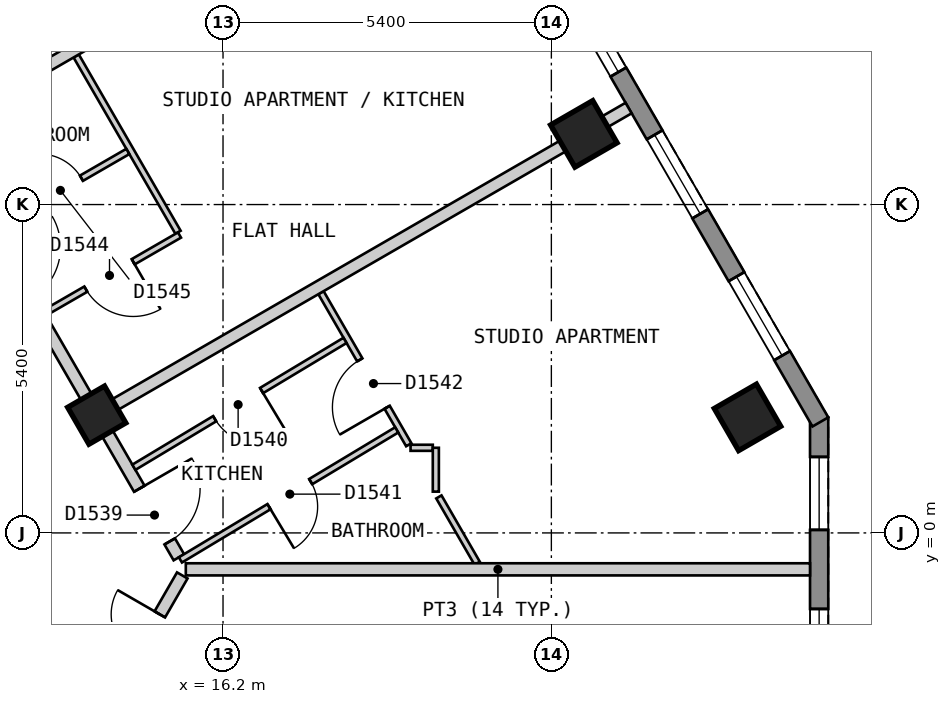
"""IFC4 building model, lengths in metres.
Left out: names, types, materials, properties, quantities, classifications, styles, units other than length and angle.
Written with IfcOpenShell. Run it as: python <this file> out.ifc"""

import sys

from ifc_helpers import new_model, si_unit, direction, frame, frame_2d, origin, origin_2d, place, context, subcontext, project, spatial, polyline, rectangle, outline, extrude, element, fill, save


model = new_model("IFC4")
c1 = context("Model", 3, precision=1e-05, world=origin(), true_north=direction((0.0, 1.0)))
c2 = subcontext(c1, "Body", "Model", "MODEL_VIEW")
j1 = project(units=[si_unit("LENGTHUNIT", "METRE"), si_unit("PLANEANGLEUNIT", "RADIAN")], contexts=[c1])
p1 = place(None, origin())
s1 = spatial("IfcSite", under=j1, at=p1, CompositionType="ELEMENT")
p2 = place(p1, origin())
s2 = spatial("IfcBuilding", under=s1, at=p2, CompositionType="ELEMENT")
p3 = place(p2, frame((0.0, 0.0, 190.2)))
s3 = spatial("IfcBuildingStorey", under=s2, at=p3, CompositionType="ELEMENT", Elevation=190.2)
for number, where, z_axis, x_axis in (
    (1, (24.826, 1.9, 0.0), (0.0, 0.0, 1.0), (-0.5, 0.866, 0.0)),
    (2, (22.134, 6.562, 0.0), (0.0, 0.0, 1.0), (-0.5, 0.866, 0.0)),
):
    element("IfcColumn", number, at=place(p3, frame(where, z_axis=z_axis, x_axis=x_axis)), inside=s3, PredefinedType="COLUMN", context=c2, shape_type="SweptSolid", body=[
        extrude(rectangle(XDim=0.8, YDim=0.8, at=origin_2d()), origin(), (0.0, 0.0, 1.0), 3.0),
    ])
p4 = place(p3, frame((14.123, 1.937, 0.0), z_axis=(0.0, 0.0, 1.0), x_axis=(-0.5, 0.866025403784, 0.0)))
e3 = element("IfcColumn", 3, at=p4, inside=s3, PredefinedType="COLUMN", context=c2, shape_type="SweptSolid", body=[
    extrude(rectangle(XDim=0.7, YDim=0.7, at=origin_2d()), origin(), (0.0, 0.0, 1.0), 3.0),
])
p5 = place(p3, frame((26.004, -3.1, 0.0), z_axis=(0.0, 0.0, 1.0), x_axis=(0.0, 1.0, 0.0)))
e4 = element("IfcWall", 4, at=p5, inside=s3, PredefinedType="SOLIDWALL", context=c2, shape_type="SweptSolid", body=[
    extrude(outline(polyline([(0.0, -0.15), (5.0, -0.15), (4.92, 0.15), (0.08, 0.15), (0.0, -0.15)])), origin(), (0.0, 0.0, 1.0), 2.7),
])
p6 = place(p5, frame((0.65, 0.0, 0.15)))
e5 = element("IfcOpeningElement", 5, at=p6, cuts=e4, PredefinedType="OPENING", context=c2, shape_type="SweptSolid", body=[
    extrude(rectangle(XDim=1.2, YDim=2.1, at=frame_2d((0.6, 1.05))), frame((0.0, 0.16, 0.0), z_axis=(0.0, -1.0, 0.0), x_axis=(1.0, 0.0, 0.0)), (0.0, 0.0, 1.0), 0.32),
])
p7 = place(p5, frame((3.15, 0.0, 0.15)))
e6 = element("IfcOpeningElement", 6, at=p7, cuts=e4, PredefinedType="OPENING", context=c2, shape_type="SweptSolid", body=[
    extrude(rectangle(XDim=1.2, YDim=2.1, at=frame_2d((0.6, 1.05))), frame((0.0, 0.16, 0.0), z_axis=(0.0, -1.0, 0.0), x_axis=(1.0, 0.0, 0.0)), (0.0, 0.0, 1.0), 0.32),
])
p8 = place(p3, frame((26.024, 1.825, 0.0), z_axis=(0.0, 0.0, 1.0), x_axis=(-0.500010537973, 0.866019319597, 0.0)))
e7 = element("IfcWall", 7, at=p8, inside=s3, PredefinedType="SOLIDWALL", context=c2, shape_type="SweptSolid", body=[
    extrude(outline(polyline([(0.0, -0.15), (22.863, -0.15), (22.783, 0.15), (0.08, 0.15), (0.0, -0.15)])), origin(), (0.0, 0.0, 1.0), 2.7),
])
p9 = place(p8, frame((1.259, 0.0, 0.15)))
e8 = element("IfcOpeningElement", 8, at=p9, cuts=e7, PredefinedType="OPENING", context=c2, shape_type="SweptSolid", body=[
    extrude(rectangle(XDim=1.5, YDim=2.1, at=frame_2d((0.75, 1.05))), frame((0.0, 0.16, 0.0), z_axis=(0.0, -1.0, 0.0), x_axis=(1.0, 0.0, 0.0)), (0.0, 0.0, 1.0), 0.32),
])
p10 = place(p8, frame((3.952, 0.0, 0.15)))
e9 = element("IfcOpeningElement", 9, at=p10, cuts=e7, PredefinedType="OPENING", context=c2, shape_type="SweptSolid", body=[
    extrude(rectangle(XDim=1.5, YDim=2.1, at=frame_2d((0.75, 1.05))), frame((0.0, 0.16, 0.0), z_axis=(0.0, -1.0, 0.0), x_axis=(1.0, 0.0, 0.0)), (0.0, 0.0, 1.0), 0.32),
])
p11 = place(p8, frame((6.644, 0.0, 0.15)))
e10 = element("IfcOpeningElement", 10, at=p11, cuts=e7, PredefinedType="OPENING", context=c2, shape_type="SweptSolid", body=[
    extrude(rectangle(XDim=1.5, YDim=2.1, at=frame_2d((0.75, 1.05))), frame((0.0, 0.16, 0.0), z_axis=(0.0, -1.0, 0.0), x_axis=(1.0, 0.0, 0.0)), (0.0, 0.0, 1.0), 0.32),
])
p12 = place(p8, frame((9.335, 0.0, 0.15)))
e11 = element("IfcOpeningElement", 11, at=p12, cuts=e7, PredefinedType="OPENING", context=c2, shape_type="SweptSolid", body=[
    extrude(rectangle(XDim=1.5, YDim=2.1, at=frame_2d((0.75, 1.05))), frame((0.0, 0.16, 0.0), z_axis=(0.0, -1.0, 0.0), x_axis=(1.0, 0.0, 0.0)), (0.0, 0.0, 1.0), 0.32),
])
p13 = place(p8, frame((12.028, 0.0, 0.15)))
e12 = element("IfcOpeningElement", 12, at=p13, cuts=e7, PredefinedType="OPENING", context=c2, shape_type="SweptSolid", body=[
    extrude(rectangle(XDim=1.5, YDim=2.1, at=frame_2d((0.75, 1.05))), frame((0.0, 0.16, 0.0), z_axis=(0.0, -1.0, 0.0), x_axis=(1.0, 0.0, 0.0)), (0.0, 0.0, 1.0), 0.32),
])
p14 = place(p8, frame((14.72, 0.0, 0.15)))
e13 = element("IfcOpeningElement", 13, at=p14, cuts=e7, PredefinedType="OPENING", context=c2, shape_type="SweptSolid", body=[
    extrude(rectangle(XDim=1.5, YDim=2.1, at=frame_2d((0.75, 1.05))), frame((0.0, 0.16, 0.0), z_axis=(0.0, -1.0, 0.0), x_axis=(1.0, 0.0, 0.0)), (0.0, 0.0, 1.0), 0.32),
])
p15 = place(p8, frame((17.411, 0.0, 0.15)))
e14 = element("IfcOpeningElement", 14, at=p15, cuts=e7, PredefinedType="OPENING", context=c2, shape_type="SweptSolid", body=[
    extrude(rectangle(XDim=1.5, YDim=2.1, at=frame_2d((0.75, 1.05))), frame((0.0, 0.16, 0.0), z_axis=(0.0, -1.0, 0.0), x_axis=(1.0, 0.0, 0.0)), (0.0, 0.0, 1.0), 0.32),
])
p16 = place(p8, frame((20.104, 0.0, 0.15)))
e15 = element("IfcOpeningElement", 15, at=p16, cuts=e7, PredefinedType="OPENING", context=c2, shape_type="SweptSolid", body=[
    extrude(rectangle(XDim=1.5, YDim=2.1, at=frame_2d((0.75, 1.05))), frame((0.0, 0.16, 0.0), z_axis=(0.0, -1.0, 0.0), x_axis=(1.0, 0.0, 0.0)), (0.0, 0.0, 1.0), 0.32),
])
p17 = place(p3, frame((10.739, 7.8, 0.0), z_axis=(0.0, 0.0, 1.0), x_axis=(0.500023726918, -0.866011704609, 0.0)))
e16 = element("IfcWall", 16, at=p17, inside=s3, PredefinedType="PARTITIONING", context=c2, shape_type="SweptSolid", body=[
    extrude(rectangle(XDim=9.47, YDim=0.2, at=frame_2d((4.735, 0.0))), origin(), (0.0, 0.0, 1.0), 2.7),
])
p18 = place(p17, frame((8.168, 0.0, 0.0)))
e17 = element("IfcOpeningElement", 17, at=p18, cuts=e16, PredefinedType="OPENING", context=c2, shape_type="SweptSolid", body=[
    extrude(rectangle(XDim=1.0, YDim=2.1, at=frame_2d((0.5, 1.05))), frame((0.0, 0.11, 0.0), z_axis=(0.0, -1.0, 0.0), x_axis=(1.0, 0.0, 0.0)), (0.0, 0.0, 1.0), 0.22),
])
p19 = place(p17, frame((3.578, 0.0, 0.0)))
e18 = element("IfcOpeningElement", 18, at=p19, cuts=e16, PredefinedType="OPENING", context=c2, shape_type="SweptSolid", body=[
    extrude(rectangle(XDim=1.0, YDim=2.1, at=frame_2d((0.5, 1.05))), frame((0.0, 0.11, 0.0), z_axis=(0.0, -1.0, 0.0), x_axis=(1.0, 0.0, 0.0)), (0.0, 0.0, 1.0), 0.22),
])
p20 = place(p3, frame((14.318, -2.8, 0.0), z_axis=(0.0, 0.0, 1.0), x_axis=(0.49964693309, 0.866229151122, 0.0)))
e19 = element("IfcWall", 19, at=p20, inside=s3, PredefinedType="PARTITIONING", context=c2, shape_type="SweptSolid", body=[
    extrude(rectangle(XDim=2.426, YDim=0.2, at=frame_2d((1.213, 0.0))), origin(), (0.0, 0.0, 1.0), 2.7),
])
p21 = place(p20, frame((0.886, 0.0, 0.0)))
e20 = element("IfcOpeningElement", 20, at=p21, cuts=e19, PredefinedType="OPENING", context=c2, shape_type="SweptSolid", body=[
    extrude(rectangle(XDim=0.8, YDim=2.1, at=frame_2d((0.4, 1.05))), frame((0.0, 0.11, 0.0), z_axis=(0.0, -1.0, 0.0), x_axis=(1.0, 0.0, 0.0)), (0.0, 0.0, 1.0), 0.22),
])
p22 = place(p3, frame((13.785, 7.844, 0.0), z_axis=(0.0, 0.0, 1.0), x_axis=(0.500176784828, -0.865923312955, 0.0)))
e21 = element("IfcWall", 21, at=p22, inside=s3, PredefinedType="PARTITIONING", context=c2, shape_type="SweptSolid", body=[
    extrude(rectangle(XDim=3.349, YDim=0.1, at=frame_2d((1.674, 0.0))), origin(), (0.0, 0.0, 1.0), 2.7),
])
p23 = place(p3, frame((17.811, 3.951, 0.0), z_axis=(0.0, 0.0, 1.0), x_axis=(0.499976149225, -0.866039173598, 0.0)))
e22 = element("IfcWall", 22, at=p23, inside=s3, PredefinedType="PARTITIONING", context=c2, shape_type="SweptSolid", body=[
    extrude(rectangle(XDim=2.888, YDim=0.1, at=frame_2d((1.444, 0.0))), origin(), (0.0, 0.0, 1.0), 2.7),
])
p24 = place(p23, frame((1.276, 0.0, 0.0)))
e23 = element("IfcOpeningElement", 23, at=p24, cuts=e22, PredefinedType="OPENING", context=c2, shape_type="SweptSolid", body=[
    extrude(rectangle(XDim=0.9, YDim=2.1, at=frame_2d((0.45, 1.05))), frame((0.0, 0.06, 0.0), z_axis=(0.0, -1.0, 0.0), x_axis=(1.0, 0.0, 0.0)), (0.0, 0.0, 1.0), 0.12),
])
p25 = place(p3, frame((19.75, 0.592, 0.0), z_axis=(0.0, 0.0, 1.0), x_axis=(0.499974077718, -0.866040369504, 0.0)))
e24 = element("IfcWall", 24, at=p25, inside=s3, PredefinedType="PARTITIONING", context=c2, shape_type="SweptSolid", body=[
    extrude(rectangle(XDim=1.26, YDim=0.1, at=frame_2d((0.63, 0.0))), origin(), (0.0, 0.0, 1.0), 2.7),
])
p26 = place(p3, frame((19.284, 1.4, 0.0), z_axis=(0.0, 0.0, 1.0), x_axis=(1.0, 0.0, 0.0)))
e25 = element("IfcWall", 25, at=p26, inside=s3, PredefinedType="PARTITIONING", context=c2, shape_type="SweptSolid", body=[
    extrude(rectangle(XDim=0.366, YDim=0.1, at=frame_2d((0.183, 0.0))), origin(), (0.0, 0.0, 1.0), 2.7),
])
p27 = place(p3, frame((19.7, 0.679, 0.0), z_axis=(0.0, 0.0, 1.0), x_axis=(0.0, 1.0, 0.0)))
e26 = element("IfcWall", 26, at=p27, inside=s3, PredefinedType="PARTITIONING", context=c2, shape_type="SweptSolid", body=[
    extrude(rectangle(XDim=0.721, YDim=0.1, at=frame_2d((0.36, 0.0))), origin(), (0.0, 0.0, 1.0), 2.7),
])
p28 = place(p3, frame((13.268, 3.619, 0.0), z_axis=(0.0, 0.0, 1.0), x_axis=(0.865902724456, 0.500212426655, 0.0)))
e27 = element("IfcWall", 27, at=p28, inside=s3, PredefinedType="PARTITIONING", context=c2, shape_type="SweptSolid", body=[
    extrude(rectangle(XDim=2.559, YDim=0.1, at=frame_2d((1.28, 0.0))), origin(), (0.0, 0.0, 1.0), 2.7),
])
p29 = place(p28, frame((0.78, 0.0, 0.0)))
e28 = element("IfcOpeningElement", 28, at=p29, cuts=e27, PredefinedType="OPENING", context=c2, shape_type="SweptSolid", body=[
    extrude(rectangle(XDim=0.9, YDim=2.1, at=frame_2d((0.45, 1.05))), frame((0.0, 0.06, 0.0), z_axis=(0.0, -1.0, 0.0), x_axis=(1.0, 0.0, 0.0)), (0.0, 0.0, 1.0), 0.12),
])
p30 = place(p3, frame((12.46, 5.018, 0.0), z_axis=(0.0, 0.0, 1.0), x_axis=(0.866080321209, 0.499904868165, 0.0)))
e29 = element("IfcWall", 29, at=p30, inside=s3, PredefinedType="PARTITIONING", context=c2, shape_type="SweptSolid", body=[
    extrude(rectangle(XDim=2.51, YDim=0.1, at=frame_2d((1.255, 0.0))), origin(), (0.0, 0.0, 1.0), 2.7),
])
p31 = place(p30, frame((0.83, 0.0, 0.0)))
e30 = element("IfcOpeningElement", 30, at=p31, cuts=e29, PredefinedType="OPENING", context=c2, shape_type="SweptSolid", body=[
    extrude(rectangle(XDim=0.8, YDim=2.1, at=frame_2d((0.4, 1.05))), frame((0.0, 0.06, 0.0), z_axis=(0.0, -1.0, 0.0), x_axis=(1.0, 0.0, 0.0)), (0.0, 0.0, 1.0), 0.12),
])
p32 = place(p3, frame((14.734, 1.08, 0.0), z_axis=(0.0, 0.0, 1.0), x_axis=(0.857205608004, 0.514974315482, 0.0)))
e31 = element("IfcWall", 31, at=p32, inside=s3, PredefinedType="PARTITIONING", context=c2, shape_type="SweptSolid", body=[
    extrude(rectangle(XDim=4.051, YDim=0.1, at=frame_2d((2.025, 0.0))), origin(), (0.0, 0.0, 1.0), 2.7),
])
p33 = place(p32, frame((1.55, 0.0, 0.0)))
e32 = element("IfcOpeningElement", 32, at=p33, cuts=e31, PredefinedType="OPENING", context=c2, shape_type="SweptSolid", body=[
    extrude(rectangle(XDim=0.9, YDim=2.1, at=frame_2d((0.45, 1.05))), frame((0.0, 0.06, 0.0), z_axis=(0.0, -1.0, 0.0), x_axis=(1.0, 0.0, 0.0)), (0.0, 0.0, 1.0), 0.12),
])
p34 = place(p3, frame((15.499, -0.444, 0.0), z_axis=(0.0, 0.0, 1.0), x_axis=(0.857061798163, 0.515213619899, 0.0)))
e33 = element("IfcWall", 33, at=p34, inside=s3, PredefinedType="PARTITIONING", context=c2, shape_type="SweptSolid", body=[
    extrude(rectangle(XDim=4.15, YDim=0.1, at=frame_2d((2.075, 0.0))), origin(), (0.0, 0.0, 1.0), 2.7),
])
p35 = place(p34, frame((1.7, 0.0, 0.0)))
e34 = element("IfcOpeningElement", 34, at=p35, cuts=e33, PredefinedType="OPENING", context=c2, shape_type="SweptSolid", body=[
    extrude(rectangle(XDim=0.8, YDim=2.1, at=frame_2d((0.4, 1.05))), frame((0.0, 0.06, 0.0), z_axis=(0.0, -1.0, 0.0), x_axis=(1.0, 0.0, 0.0)), (0.0, 0.0, 1.0), 0.12),
])
p36 = place(p3, frame((15.588, -0.599, 0.0), z_axis=(0.0, 0.0, 1.0), x_axis=(1.0, 0.0, 0.0)))
e35 = element("IfcWall", 35, at=p36, inside=s3, PredefinedType="PARTITIONING", context=c2, shape_type="SweptSolid", body=[
    extrude(rectangle(XDim=10.266, YDim=0.2, at=frame_2d((5.133, 0.0))), origin(), (0.0, 0.0, 1.0), 2.7),
])
p37 = place(p3, frame((14.21, 1.987, 0.0), z_axis=(0.0, 0.0, 1.0), x_axis=(0.866022959057, 0.500004234368, 0.0)))
e36 = element("IfcWall", 36, at=p37, inside=s3, PredefinedType="PARTITIONING", context=c2, shape_type="SweptSolid", body=[
    extrude(rectangle(XDim=10.0, YDim=0.2, at=frame_2d((5.0, 0.0))), origin(), (0.0, 0.0, 1.0), 2.7),
])
p38 = place(p3, frame((11.518, 6.65, 0.0), z_axis=(0.0, 0.0, 1.0), x_axis=(0.866016855193, 0.500014806302, 0.0)))
e37 = element("IfcWall", 37, at=p38, inside=s3, PredefinedType="PARTITIONING", context=c2, shape_type="SweptSolid", body=[
    extrude(rectangle(XDim=10.0, YDim=0.2, at=frame_2d((5.0, 0.0))), origin(), (0.0, 0.0, 1.0), 2.7),
])
p39 = place(p6, origin())
e38 = element("IfcWindow", 38, at=p39, inside=s3, PartitioningType="SINGLE_PANEL", PredefinedType="WINDOW", context=c2, shape_type="SweptSolid", body=[
    extrude(rectangle(XDim=1.2, YDim=2.1, at=frame_2d((0.6, 1.05))), frame((0.0, 0.03, 0.0), z_axis=(0.0, -1.0, 0.0), x_axis=(1.0, 0.0, 0.0)), (0.0, 0.0, 1.0), 0.06),
])
fill(e5, e38)
p40 = place(p7, origin())
e39 = element("IfcWindow", 39, at=p40, inside=s3, PartitioningType="SINGLE_PANEL", PredefinedType="WINDOW", context=c2, shape_type="SweptSolid", body=[
    extrude(rectangle(XDim=1.2, YDim=2.1, at=frame_2d((0.6, 1.05))), frame((0.0, 0.03, 0.0), z_axis=(0.0, -1.0, 0.0), x_axis=(1.0, 0.0, 0.0)), (0.0, 0.0, 1.0), 0.06),
])
fill(e6, e39)
p41 = place(p9, origin())
e40 = element("IfcWindow", 40, at=p41, inside=s3, PartitioningType="SINGLE_PANEL", PredefinedType="WINDOW", context=c2, shape_type="SweptSolid", body=[
    extrude(rectangle(XDim=1.5, YDim=2.1, at=frame_2d((0.75, 1.05))), frame((0.0, 0.03, 0.0), z_axis=(0.0, -1.0, 0.0), x_axis=(1.0, 0.0, 0.0)), (0.0, 0.0, 1.0), 0.06),
])
fill(e8, e40)
p42 = place(p10, origin())
e41 = element("IfcWindow", 41, at=p42, inside=s3, PartitioningType="SINGLE_PANEL", PredefinedType="WINDOW", context=c2, shape_type="SweptSolid", body=[
    extrude(rectangle(XDim=1.5, YDim=2.1, at=frame_2d((0.75, 1.05))), frame((0.0, 0.03, 0.0), z_axis=(0.0, -1.0, 0.0), x_axis=(1.0, 0.0, 0.0)), (0.0, 0.0, 1.0), 0.06),
])
fill(e9, e41)
p43 = place(p11, origin())
e42 = element("IfcWindow", 42, at=p43, inside=s3, PartitioningType="SINGLE_PANEL", PredefinedType="WINDOW", context=c2, shape_type="SweptSolid", body=[
    extrude(rectangle(XDim=1.5, YDim=2.1, at=frame_2d((0.75, 1.05))), frame((0.0, 0.03, 0.0), z_axis=(0.0, -1.0, 0.0), x_axis=(1.0, 0.0, 0.0)), (0.0, 0.0, 1.0), 0.06),
])
fill(e10, e42)
p44 = place(p21, origin())
e43 = element("IfcDoor", 43, at=p44, inside=s3, OperationType="SINGLE_SWING_RIGHT", PredefinedType="DOOR", context=c2, shape_type="SweptSolid", body=[
    extrude(rectangle(XDim=0.8, YDim=2.1, at=frame_2d((0.4, 1.05))), frame((0.0, 0.025, 0.0), z_axis=(0.0, -1.0, 0.0), x_axis=(1.0, 0.0, 0.0)), (0.0, 0.0, 1.0), 0.05),
])
fill(e20, e43)
p45 = place(p18, origin())
e44 = element("IfcDoor", 44, at=p45, inside=s3, OperationType="SINGLE_SWING_LEFT", PredefinedType="DOOR", context=c2, shape_type="SweptSolid", body=[
    extrude(rectangle(XDim=1.0, YDim=2.1, at=frame_2d((0.5, 1.05))), frame((0.0, 0.025, 0.0), z_axis=(0.0, -1.0, 0.0), x_axis=(1.0, 0.0, 0.0)), (0.0, 0.0, 1.0), 0.05),
])
fill(e17, e44)
p46 = place(p33, origin())
e45 = element("IfcDoor", 45, at=p46, inside=s3, OperationType="SINGLE_SWING_RIGHT", PredefinedType="DOOR", context=c2, shape_type="SweptSolid", body=[
    extrude(rectangle(XDim=0.9, YDim=2.1, at=frame_2d((0.45, 1.05))), frame((0.0, 0.025, 0.0), z_axis=(0.0, -1.0, 0.0), x_axis=(1.0, 0.0, 0.0)), (0.0, 0.0, 1.0), 0.05),
])
fill(e32, e45)
p47 = place(p35, origin())
e46 = element("IfcDoor", 46, at=p47, inside=s3, OperationType="SINGLE_SWING_LEFT", PredefinedType="DOOR", context=c2, shape_type="SweptSolid", body=[
    extrude(rectangle(XDim=0.8, YDim=2.1, at=frame_2d((0.4, 1.05))), frame((0.0, 0.025, 0.0), z_axis=(0.0, -1.0, 0.0), x_axis=(1.0, 0.0, 0.0)), (0.0, 0.0, 1.0), 0.05),
])
fill(e34, e46)
p48 = place(p24, origin())
e47 = element("IfcDoor", 47, at=p48, inside=s3, OperationType="SINGLE_SWING_RIGHT", PredefinedType="DOOR", context=c2, shape_type="SweptSolid", body=[
    extrude(rectangle(XDim=0.9, YDim=2.1, at=frame_2d((0.45, 1.05))), frame((0.0, 0.025, 0.0), z_axis=(0.0, -1.0, 0.0), x_axis=(1.0, 0.0, 0.0)), (0.0, 0.0, 1.0), 0.05),
])
fill(e23, e47)
p49 = place(p29, origin())
e48 = element("IfcDoor", 48, at=p49, inside=s3, OperationType="SINGLE_SWING_RIGHT", PredefinedType="DOOR", context=c2, shape_type="SweptSolid", body=[
    extrude(rectangle(XDim=0.9, YDim=2.1, at=frame_2d((0.45, 1.05))), frame((0.0, 0.025, 0.0), z_axis=(0.0, -1.0, 0.0), x_axis=(1.0, 0.0, 0.0)), (0.0, 0.0, 1.0), 0.05),
])
fill(e28, e48)
p50 = place(p31, origin())
e49 = element("IfcDoor", 49, at=p50, inside=s3, OperationType="SINGLE_SWING_LEFT", PredefinedType="DOOR", context=c2, shape_type="SweptSolid", body=[
    extrude(rectangle(XDim=0.8, YDim=2.1, at=frame_2d((0.4, 1.05))), frame((0.0, 0.025, 0.0), z_axis=(0.0, -1.0, 0.0), x_axis=(1.0, 0.0, 0.0)), (0.0, 0.0, 1.0), 0.05),
])
fill(e30, e49)
save(model, sys.argv[1])
